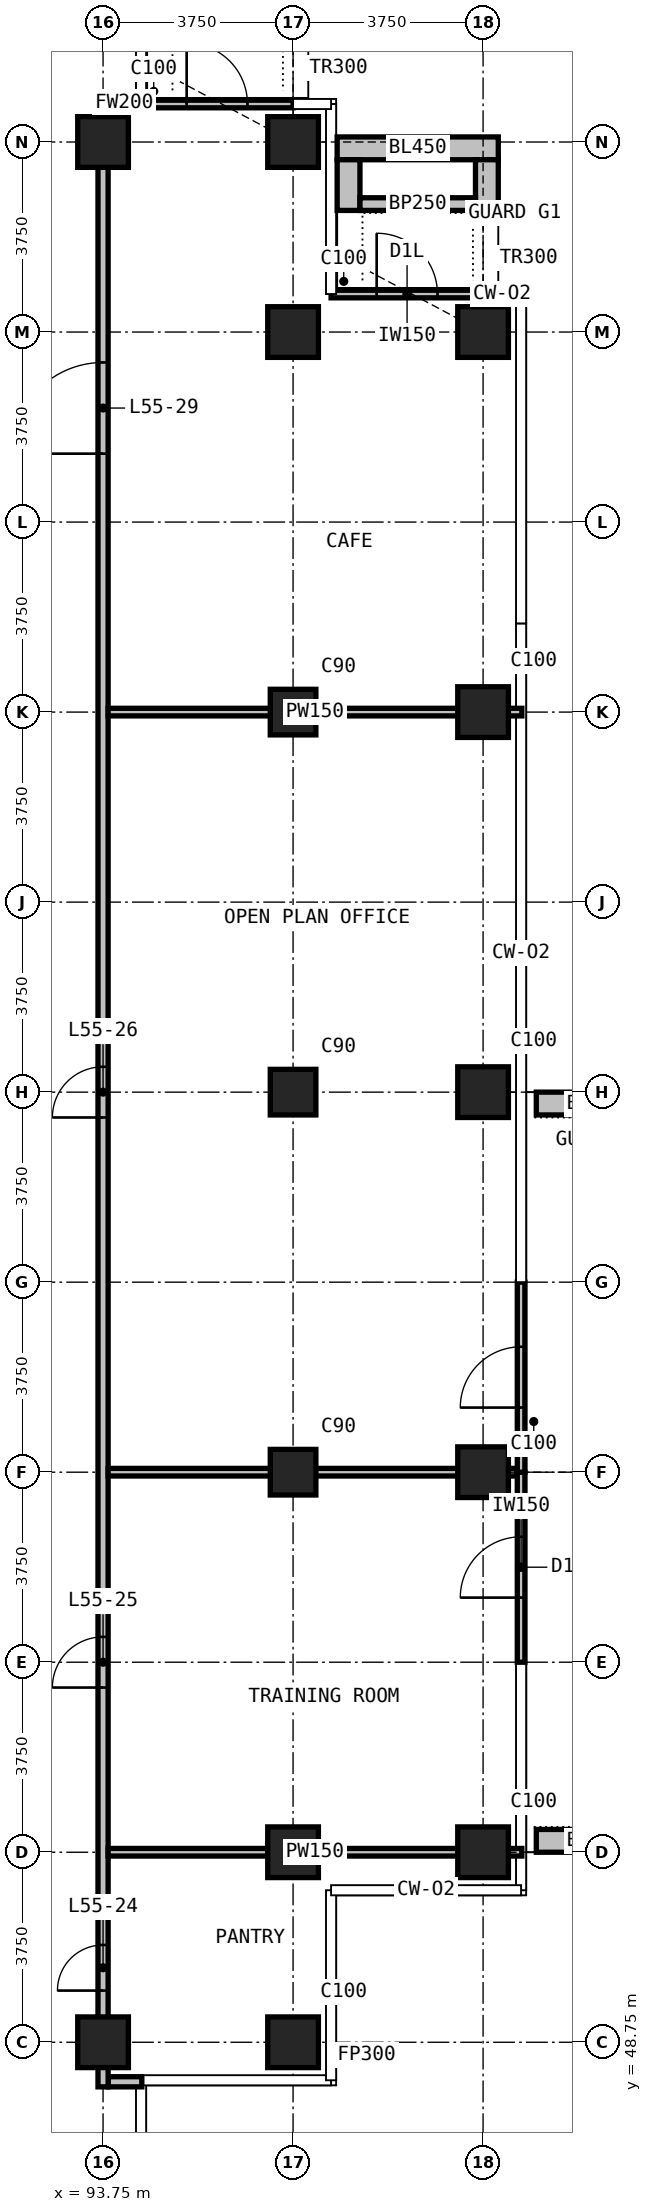
"""IFC4 building model, lengths in metres.
Left out: names, types, materials, properties, quantities, classifications, styles, units other than length and angle.
Written with IfcOpenShell. Run it as: python <this file> out.ifc"""

import sys

from ifc_helpers import new_model, si_unit, direction, frame, frame_2d, origin, origin_2d, place, context, subcontext, project, spatial, rectangle, extrude, element, fill, save


model = new_model("IFC4")
c1 = context("Model", 3, precision=1e-05, world=origin(), true_north=direction((0.0, 1.0)))
c2 = subcontext(c1, "Body", "Model", "MODEL_VIEW")
j1 = project(units=[si_unit("LENGTHUNIT", "METRE"), si_unit("PLANEANGLEUNIT", "RADIAN")], contexts=[c1])
p1 = place(None, origin())
s1 = spatial("IfcSite", under=j1, at=p1, CompositionType="ELEMENT")
p2 = place(p1, origin())
s2 = spatial("IfcBuilding", under=s1, at=p2, CompositionType="ELEMENT")
p3 = place(p2, frame((0.0, 0.0, 213.9)))
s3 = spatial("IfcBuildingStorey", under=s2, at=p3, CompositionType="ELEMENT", Elevation=213.9)
for number, where, z_axis, x_axis in (
    (1, (93.75, 48.75, 0.0), (0.0, 0.0, 1.0), (1.0, 0.0, 0.0)),
    (2, (93.75, 86.25, 0.0), (0.0, 0.0, 1.0), (1.0, 0.0, 0.0)),
    (3, (97.5, 48.75, 0.0), (0.0, 0.0, 1.0), (1.0, 0.0, 0.0)),
    (4, (97.5, 52.5, 0.0), (0.0, 0.0, 1.0), (1.0, 0.0, 0.0)),
):
    element("IfcColumn", number, at=place(p3, frame(where, z_axis=z_axis, x_axis=x_axis)), inside=s3, PredefinedType="COLUMN", context=c2, shape_type="SweptSolid", body=[
        extrude(rectangle(XDim=1.0, YDim=1.0, at=origin_2d()), origin(), (0.0, 0.0, 1.0), 3.6),
    ])
for number, where, z_axis, x_axis in (
    (5, (97.5, 60.0, 0.0), (0.0, 0.0, 1.0), (1.0, 0.0, 0.0)),
    (6, (97.5, 67.5, 0.0), (0.0, 0.0, 1.0), (1.0, 0.0, 0.0)),
    (7, (97.5, 75.0, 0.0), (0.0, 0.0, 1.0), (1.0, 0.0, 0.0)),
):
    element("IfcColumn", number, at=place(p3, frame(where, z_axis=z_axis, x_axis=x_axis)), inside=s3, PredefinedType="COLUMN", context=c2, shape_type="SweptSolid", body=[
        extrude(rectangle(XDim=0.9, YDim=0.9, at=origin_2d()), origin(), (0.0, 0.0, 1.0), 3.6),
    ])
for number, where, z_axis, x_axis in (
    (8, (97.5, 82.5, 0.0), (0.0, 0.0, 1.0), (1.0, 0.0, 0.0)),
    (9, (97.5, 86.25, 0.0), (0.0, 0.0, 1.0), (1.0, 0.0, 0.0)),
    (10, (101.25, 52.5, 0.0), (0.0, 0.0, 1.0), (1.0, 0.0, 0.0)),
    (11, (101.25, 60.0, 0.0), (0.0, 0.0, 1.0), (1.0, 0.0, 0.0)),
    (12, (101.25, 67.5, 0.0), (0.0, 0.0, 1.0), (1.0, 0.0, 0.0)),
    (13, (101.25, 75.0, 0.0), (0.0, 0.0, 1.0), (1.0, 0.0, 0.0)),
    (14, (101.25, 82.5, 0.0), (0.0, 0.0, 1.0), (1.0, 0.0, 0.0)),
):
    element("IfcColumn", number, at=place(p3, frame(where, z_axis=z_axis, x_axis=x_axis)), inside=s3, PredefinedType="COLUMN", context=c2, shape_type="SweptSolid", body=[
        extrude(rectangle(XDim=1.0, YDim=1.0, at=origin_2d()), origin(), (0.0, 0.0, 1.0), 3.6),
    ])
p4 = place(p3, frame((102.0, 56.25, 0.0), z_axis=(0.0, 0.0, 1.0), x_axis=(0.0, 1.0, 0.0)))
e15 = element("IfcWall", 15, at=p4, inside=s3, PredefinedType="SOLIDWALL", context=c2, shape_type="SweptSolid", body=[
    extrude(rectangle(XDim=3.75, YDim=0.15, at=frame_2d((1.875, 0.0))), origin(), (0.0, 0.0, 1.0), 3.3),
])
p5 = place(p4, frame((1.275, 0.0, 0.0)))
e16 = element("IfcOpeningElement", 16, at=p5, cuts=e15, PredefinedType="OPENING", context=c2, shape_type="SweptSolid", body=[
    extrude(rectangle(XDim=1.2, YDim=2.4, at=frame_2d((0.6, 1.2))), frame((0.0, 0.085, 0.0), z_axis=(0.0, -1.0, 0.0), x_axis=(1.0, 0.0, 0.0)), (0.0, 0.0, 1.0), 0.17),
])
p6 = place(p3, frame((102.0, 60.0, 0.0), z_axis=(0.0, 0.0, 1.0), x_axis=(0.0, 1.0, 0.0)))
e17 = element("IfcWall", 17, at=p6, inside=s3, PredefinedType="SOLIDWALL", context=c2, shape_type="SweptSolid", body=[
    extrude(rectangle(XDim=3.75, YDim=0.15, at=frame_2d((1.875, 0.0))), origin(), (0.0, 0.0, 1.0), 3.3),
])
p7 = place(p6, frame((1.275, 0.0, 0.0)))
e18 = element("IfcOpeningElement", 18, at=p7, cuts=e17, PredefinedType="OPENING", context=c2, shape_type="SweptSolid", body=[
    extrude(rectangle(XDim=1.2, YDim=2.4, at=frame_2d((0.6, 1.2))), frame((0.0, 0.085, 0.0), z_axis=(0.0, -1.0, 0.0), x_axis=(1.0, 0.0, 0.0)), (0.0, 0.0, 1.0), 0.17),
])
p8 = place(p3, frame((98.25, 83.25, 0.0), z_axis=(0.0, 0.0, 1.0), x_axis=(1.0, 0.0, 0.0)))
e19 = element("IfcWall", 19, at=p8, inside=s3, PredefinedType="SOLIDWALL", context=c2, shape_type="SweptSolid", body=[
    extrude(rectangle(XDim=3.0, YDim=0.15, at=frame_2d((1.5, 0.0))), origin(), (0.0, 0.0, 1.0), 3.3),
])
p9 = place(p8, frame((0.9, 0.0, 0.0)))
e20 = element("IfcOpeningElement", 20, at=p9, cuts=e19, PredefinedType="OPENING", context=c2, shape_type="SweptSolid", body=[
    extrude(rectangle(XDim=1.2, YDim=2.0, at=frame_2d((0.6, 1.0))), frame((0.0, 0.085, 0.0), z_axis=(0.0, -1.0, 0.0), x_axis=(1.0, 0.0, 0.0)), (0.0, 0.0, 1.0), 0.17),
])
p10 = place(p3, frame((94.5, 87.0, 0.0), z_axis=(0.0, 0.0, 1.0), x_axis=(1.0, 0.0, 0.0)))
e21 = element("IfcWall", 21, at=p10, inside=s3, PredefinedType="SOLIDWALL", context=c2, shape_type="SweptSolid", body=[
    extrude(rectangle(XDim=3.0, YDim=0.15, at=frame_2d((1.5, 0.0))), origin(), (0.0, 0.0, 1.0), 3.3),
])
p11 = place(p10, frame((0.9, 0.0, 0.0)))
e22 = element("IfcOpeningElement", 22, at=p11, cuts=e21, PredefinedType="OPENING", context=c2, shape_type="SweptSolid", body=[
    extrude(rectangle(XDim=1.2, YDim=2.0, at=frame_2d((0.6, 1.0))), frame((0.0, 0.085, 0.0), z_axis=(0.0, -1.0, 0.0), x_axis=(1.0, 0.0, 0.0)), (0.0, 0.0, 1.0), 0.17),
])
for number, where, z_axis, x_axis in (
    (23, (102.3, 52.725, 0.0), (0.0, 0.0, 1.0), (1.0, 0.0, 0.0)),
    (24, (102.3, 67.275, 0.0), (0.0, 0.0, 1.0), (1.0, 0.0, 0.0)),
):
    element("IfcWall", number, at=place(p3, frame(where, z_axis=z_axis, x_axis=x_axis)), inside=s3, PredefinedType="USERDEFINED", context=c2, shape_type="SweptSolid", body=[
        extrude(rectangle(XDim=2.35, YDim=0.45, at=frame_2d((1.175, 0.0))), origin(), (0.0, 0.0, 1.0), 1.1),
    ])
p12 = place(p3, frame((98.37, 86.125, 0.0), z_axis=(0.0, 0.0, 1.0), x_axis=(1.0, 0.0, 0.0)))
e25 = element("IfcWall", 25, at=p12, inside=s3, PredefinedType="USERDEFINED", context=c2, shape_type="SweptSolid", body=[
    extrude(rectangle(XDim=3.18, YDim=0.45, at=frame_2d((1.59, 0.0))), origin(), (0.0, 0.0, 1.0), 1.1),
])
for number, where, z_axis, x_axis in (
    (26, (98.595, 84.9, 0.0), (0.0, 0.0, 1.0), (0.0, 1.0, 0.0)),
    (27, (101.325, 84.9, 0.0), (0.0, 0.0, 1.0), (0.0, 1.0, 0.0)),
):
    element("IfcWall", number, at=place(p3, frame(where, z_axis=z_axis, x_axis=x_axis)), inside=s3, PredefinedType="USERDEFINED", context=c2, shape_type="SweptSolid", body=[
        extrude(rectangle(XDim=1.0, YDim=0.45, at=frame_2d((0.5, 0.0))), origin(), (0.0, 0.0, 1.0), 1.1),
    ])
p13 = place(p3, frame((98.82, 85.025, 0.0), z_axis=(0.0, 0.0, 1.0), x_axis=(1.0, 0.0, 0.0)))
e28 = element("IfcWall", 28, at=p13, inside=s3, PredefinedType="USERDEFINED", context=c2, shape_type="SweptSolid", body=[
    extrude(rectangle(XDim=2.28, YDim=0.25, at=frame_2d((1.14, 0.0))), origin(), (0.0, 0.0, 1.0), 1.0),
])
p14 = place(p3, frame((93.85, 47.97, 0.0), z_axis=(0.0, 0.0, 1.0), x_axis=(1.0, 0.0, 0.0)))
e29 = element("IfcWall", 29, at=p14, inside=s3, PredefinedType="PARTITIONING", context=c2, shape_type="SweptSolid", body=[
    extrude(rectangle(XDim=0.665, YDim=0.2, at=frame_2d((0.333, 0.0))), origin(), (0.0, 0.0, 1.0), 3.3),
])
p15 = place(p3, frame((93.85, 87.03, 0.0), z_axis=(0.0, 0.0, 1.0), x_axis=(1.0, 0.0, 0.0)))
e30 = element("IfcWall", 30, at=p15, inside=s3, PredefinedType="PARTITIONING", context=c2, shape_type="SweptSolid", body=[
    extrude(rectangle(XDim=0.64, YDim=0.2, at=frame_2d((0.32, 0.0))), origin(), (0.0, 0.0, 1.0), 3.3),
])
p16 = place(p3, frame((93.75, 47.87, 0.0), z_axis=(0.0, 0.0, 1.0), x_axis=(0.0, 1.0, 0.0)))
e31 = element("IfcWall", 31, at=p16, inside=s3, PredefinedType="PARTITIONING", context=c2, shape_type="SweptSolid", body=[
    extrude(rectangle(XDim=39.26, YDim=0.2, at=frame_2d((19.63, 0.0))), origin(), (0.0, 0.0, 1.0), 3.3),
])
p17 = place(p16, frame((1.9, 0.0, 0.0)))
e32 = element("IfcOpeningElement", 32, at=p17, cuts=e31, PredefinedType="OPENING", context=c2, shape_type="SweptSolid", body=[
    extrude(rectangle(XDim=0.9, YDim=2.2, at=frame_2d((0.45, 1.1))), frame((0.0, 0.11, 0.0), z_axis=(0.0, -1.0, 0.0), x_axis=(1.0, 0.0, 0.0)), (0.0, 0.0, 1.0), 0.22),
])
p18 = place(p16, frame((7.88, 0.0, 0.0)))
e33 = element("IfcOpeningElement", 33, at=p18, cuts=e31, PredefinedType="OPENING", context=c2, shape_type="SweptSolid", body=[
    extrude(rectangle(XDim=1.0, YDim=2.2, at=frame_2d((0.5, 1.1))), frame((0.0, 0.11, 0.0), z_axis=(0.0, -1.0, 0.0), x_axis=(1.0, 0.0, 0.0)), (0.0, 0.0, 1.0), 0.22),
])
p19 = place(p16, frame((19.13, 0.0, 0.0)))
e34 = element("IfcOpeningElement", 34, at=p19, cuts=e31, PredefinedType="OPENING", context=c2, shape_type="SweptSolid", body=[
    extrude(rectangle(XDim=1.0, YDim=2.2, at=frame_2d((0.5, 1.1))), frame((0.0, 0.11, 0.0), z_axis=(0.0, -1.0, 0.0), x_axis=(1.0, 0.0, 0.0)), (0.0, 0.0, 1.0), 0.22),
])
p20 = place(p16, frame((32.23, 0.0, 0.0)))
e35 = element("IfcOpeningElement", 35, at=p20, cuts=e31, PredefinedType="OPENING", context=c2, shape_type="SweptSolid", body=[
    extrude(rectangle(XDim=1.8, YDim=2.2, at=frame_2d((0.9, 1.1))), frame((0.0, 0.11, 0.0), z_axis=(0.0, -1.0, 0.0), x_axis=(1.0, 0.0, 0.0)), (0.0, 0.0, 1.0), 0.22),
])
p21 = place(p3, frame((93.85, 52.5, 0.0), z_axis=(0.0, 0.0, 1.0), x_axis=(1.0, 0.0, 0.0)))
e36 = element("IfcWall", 36, at=p21, inside=s3, PredefinedType="PARTITIONING", context=c2, shape_type="SweptSolid", body=[
    extrude(rectangle(XDim=8.165, YDim=0.15, at=frame_2d((4.083, 0.0))), origin(), (0.0, 0.0, 1.0), 3.3),
])
p22 = place(p3, frame((93.85, 60.0, 0.0), z_axis=(0.0, 0.0, 1.0), x_axis=(1.0, 0.0, 0.0)))
e37 = element("IfcWall", 37, at=p22, inside=s3, PredefinedType="PARTITIONING", context=c2, shape_type="SweptSolid", body=[
    extrude(rectangle(XDim=8.065, YDim=0.15, at=frame_2d((4.032, 0.0))), origin(), (0.0, 0.0, 1.0), 3.3),
])
p23 = place(p3, frame((93.85, 75.0, 0.0), z_axis=(0.0, 0.0, 1.0), x_axis=(1.0, 0.0, 0.0)))
e38 = element("IfcWall", 38, at=p23, inside=s3, PredefinedType="PARTITIONING", context=c2, shape_type="SweptSolid", body=[
    extrude(rectangle(XDim=8.165, YDim=0.15, at=frame_2d((4.083, 0.0))), origin(), (0.0, 0.0, 1.0), 3.3),
])
p24 = place(p5, origin())
e39 = element("IfcDoor", 39, at=p24, inside=s3, OperationType="SINGLE_SWING_LEFT", PredefinedType="DOOR", context=c2, shape_type="SweptSolid", body=[
    extrude(rectangle(XDim=1.2, YDim=2.4, at=frame_2d((0.6, 1.2))), frame((0.0, 0.025, 0.0), z_axis=(0.0, -1.0, 0.0), x_axis=(1.0, 0.0, 0.0)), (0.0, 0.0, 1.0), 0.05),
])
fill(e16, e39)
p25 = place(p7, origin())
e40 = element("IfcDoor", 40, at=p25, inside=s3, OperationType="SINGLE_SWING_LEFT", PredefinedType="DOOR", context=c2, shape_type="SweptSolid", body=[
    extrude(rectangle(XDim=1.2, YDim=2.4, at=frame_2d((0.6, 1.2))), frame((0.0, 0.025, 0.0), z_axis=(0.0, -1.0, 0.0), x_axis=(1.0, 0.0, 0.0)), (0.0, 0.0, 1.0), 0.05),
])
fill(e18, e40)
p26 = place(p9, origin())
e41 = element("IfcDoor", 41, at=p26, inside=s3, OperationType="SINGLE_SWING_LEFT", PredefinedType="DOOR", context=c2, shape_type="SweptSolid", body=[
    extrude(rectangle(XDim=1.2, YDim=2.0, at=frame_2d((0.6, 1.0))), frame((0.0, 0.025, 0.0), z_axis=(0.0, -1.0, 0.0), x_axis=(1.0, 0.0, 0.0)), (0.0, 0.0, 1.0), 0.05),
])
fill(e20, e41)
p27 = place(p11, origin())
e42 = element("IfcDoor", 42, at=p27, inside=s3, OperationType="SINGLE_SWING_LEFT", PredefinedType="DOOR", context=c2, shape_type="SweptSolid", body=[
    extrude(rectangle(XDim=1.2, YDim=2.0, at=frame_2d((0.6, 1.0))), frame((0.0, 0.025, 0.0), z_axis=(0.0, -1.0, 0.0), x_axis=(1.0, 0.0, 0.0)), (0.0, 0.0, 1.0), 0.05),
])
fill(e22, e42)
p28 = place(p17, origin())
e43 = element("IfcDoor", 43, at=p28, inside=s3, OperationType="SINGLE_SWING_RIGHT", PredefinedType="DOOR", context=c2, shape_type="SweptSolid", body=[
    extrude(rectangle(XDim=0.9, YDim=2.2, at=frame_2d((0.45, 1.1))), frame((0.0, 0.025, 0.0), z_axis=(0.0, -1.0, 0.0), x_axis=(1.0, 0.0, 0.0)), (0.0, 0.0, 1.0), 0.05),
])
fill(e32, e43)
p29 = place(p18, origin())
e44 = element("IfcDoor", 44, at=p29, inside=s3, OperationType="SINGLE_SWING_LEFT", PredefinedType="DOOR", context=c2, shape_type="SweptSolid", body=[
    extrude(rectangle(XDim=1.0, YDim=2.2, at=frame_2d((0.5, 1.1))), frame((0.0, 0.025, 0.0), z_axis=(0.0, -1.0, 0.0), x_axis=(1.0, 0.0, 0.0)), (0.0, 0.0, 1.0), 0.05),
])
fill(e33, e44)
p30 = place(p19, origin())
e45 = element("IfcDoor", 45, at=p30, inside=s3, OperationType="SINGLE_SWING_LEFT", PredefinedType="DOOR", context=c2, shape_type="SweptSolid", body=[
    extrude(rectangle(XDim=1.0, YDim=2.2, at=frame_2d((0.5, 1.1))), frame((0.0, 0.025, 0.0), z_axis=(0.0, -1.0, 0.0), x_axis=(1.0, 0.0, 0.0)), (0.0, 0.0, 1.0), 0.05),
])
fill(e34, e45)
p31 = place(p20, origin())
e46 = element("IfcDoor", 46, at=p31, inside=s3, OperationType="DOUBLE_DOOR_SINGLE_SWING", PredefinedType="DOOR", context=c2, shape_type="SweptSolid", body=[
    extrude(rectangle(XDim=1.8, YDim=2.2, at=frame_2d((0.9, 1.1))), frame((0.0, 0.025, 0.0), z_axis=(0.0, -1.0, 0.0), x_axis=(1.0, 0.0, 0.0)), (0.0, 0.0, 1.0), 0.05),
])
fill(e35, e46)
save(model, sys.argv[1])
